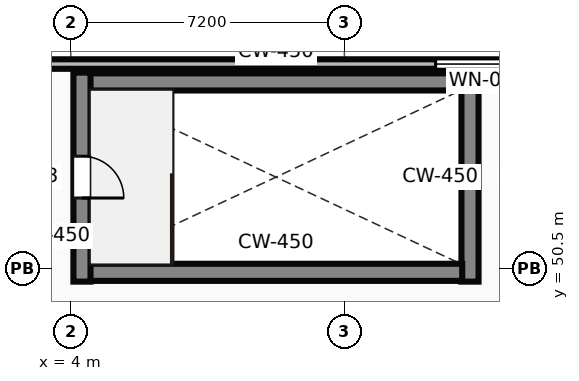
"""IFC4 building model, lengths in metres.
Left out: names, types, materials, properties, quantities, classifications, styles, units other than length and angle.
Written with IfcOpenShell. Run it as: python <this file> out.ifc"""

import sys

from ifc_helpers import new_model, si_unit, direction, frame, frame_2d, origin, place, context, subcontext, project, spatial, rectangle, extrude, source, transform, mapped, element, fill, save


model = new_model("IFC4")
c1 = context("Model", 3, precision=1e-05, world=origin(), true_north=direction((0.0, 1.0)))
c2 = subcontext(c1, "Body", "Model", "MODEL_VIEW")
j1 = project(units=[si_unit("LENGTHUNIT", "METRE"), si_unit("PLANEANGLEUNIT", "RADIAN")], contexts=[c1])
p1 = place(None, origin())
s1 = spatial("IfcSite", under=j1, at=p1, CompositionType="ELEMENT")
p2 = place(p1, origin())
s2 = spatial("IfcBuilding", under=s1, at=p2, CompositionType="ELEMENT")
p3 = place(p2, frame((0.0, 0.0, 21.0)))
s3 = spatial("IfcBuildingStorey", under=s2, at=p3, CompositionType="ELEMENT", Elevation=21.0)
m1 = source(origin(), c2, "Body", "SweptSolid", [
    extrude(rectangle(XDim=82.0, YDim=0.25, at=frame_2d((41.0, 0.0))), origin(), (0.0, 0.0, 1.0), 4.7),
])
p4 = place(p3, frame((82.0, 55.875, 0.0), z_axis=(0.0, 0.0, 1.0), x_axis=(-1.0, 0.0, 0.0)))
e1 = element("IfcWall", 1, at=p4, inside=s3, PredefinedType="STANDARD", context=c2, shape_type="MappedRepresentation", body=[
    mapped(m1, transform((0.0, 0.0, 0.0))),
])
p5 = place(p4, frame((8.0, 0.0, 0.9)))
e2 = element("IfcOpeningElement", 2, at=p5, cuts=e1, PredefinedType="OPENING", context=c2, shape_type="SweptSolid", body=[
    extrude(rectangle(XDim=2.4, YDim=2.2, at=frame_2d((1.2, 1.1))), frame((0.0, 0.135, 0.0), z_axis=(0.0, -1.0, 0.0), x_axis=(1.0, 0.0, 0.0)), (0.0, 0.0, 1.0), 0.27),
])
p6 = place(p4, frame((18.0, 0.0, 0.9)))
e3 = element("IfcOpeningElement", 3, at=p6, cuts=e1, PredefinedType="OPENING", context=c2, shape_type="SweptSolid", body=[
    extrude(rectangle(XDim=2.4, YDim=2.2, at=frame_2d((1.2, 1.1))), frame((0.0, 0.135, 0.0), z_axis=(0.0, -1.0, 0.0), x_axis=(1.0, 0.0, 0.0)), (0.0, 0.0, 1.0), 0.27),
])
p7 = place(p4, frame((28.0, 0.0, 0.9)))
e4 = element("IfcOpeningElement", 4, at=p7, cuts=e1, PredefinedType="OPENING", context=c2, shape_type="SweptSolid", body=[
    extrude(rectangle(XDim=2.4, YDim=2.2, at=frame_2d((1.2, 1.1))), frame((0.0, 0.135, 0.0), z_axis=(0.0, -1.0, 0.0), x_axis=(1.0, 0.0, 0.0)), (0.0, 0.0, 1.0), 0.27),
])
p8 = place(p4, frame((38.0, 0.0, 0.9)))
e5 = element("IfcOpeningElement", 5, at=p8, cuts=e1, PredefinedType="OPENING", context=c2, shape_type="SweptSolid", body=[
    extrude(rectangle(XDim=2.4, YDim=2.2, at=frame_2d((1.2, 1.1))), frame((0.0, 0.135, 0.0), z_axis=(0.0, -1.0, 0.0), x_axis=(1.0, 0.0, 0.0)), (0.0, 0.0, 1.0), 0.27),
])
p9 = place(p4, frame((46.5, 0.0, 0.9)))
e6 = element("IfcOpeningElement", 6, at=p9, cuts=e1, PredefinedType="OPENING", context=c2, shape_type="SweptSolid", body=[
    extrude(rectangle(XDim=2.4, YDim=2.2, at=frame_2d((1.2, 1.1))), frame((0.0, 0.135, 0.0), z_axis=(0.0, -1.0, 0.0), x_axis=(1.0, 0.0, 0.0)), (0.0, 0.0, 1.0), 0.27),
])
p10 = place(p4, frame((58.0, 0.0, 0.9)))
e7 = element("IfcOpeningElement", 7, at=p10, cuts=e1, PredefinedType="OPENING", context=c2, shape_type="SweptSolid", body=[
    extrude(rectangle(XDim=2.4, YDim=2.2, at=frame_2d((1.2, 1.1))), frame((0.0, 0.135, 0.0), z_axis=(0.0, -1.0, 0.0), x_axis=(1.0, 0.0, 0.0)), (0.0, 0.0, 1.0), 0.27),
])
p11 = place(p4, frame((66.0, 0.0, 0.9)))
e8 = element("IfcOpeningElement", 8, at=p11, cuts=e1, PredefinedType="OPENING", context=c2, shape_type="SweptSolid", body=[
    extrude(rectangle(XDim=2.4, YDim=2.2, at=frame_2d((1.2, 1.1))), frame((0.0, 0.135, 0.0), z_axis=(0.0, -1.0, 0.0), x_axis=(1.0, 0.0, 0.0)), (0.0, 0.0, 1.0), 0.27),
])
m2 = source(origin(), c2, "Body", "SweptSolid", [
    extrude(rectangle(XDim=5.5, YDim=0.45, at=frame_2d((2.75, 0.0))), origin(), (0.0, 0.0, 1.0), 4.7),
])
p12 = place(p3, frame((4.295, 50.15, 0.0), z_axis=(0.0, 0.0, 1.0), x_axis=(0.0, 1.0, 0.0)))
e9 = element("IfcWall", 9, at=p12, inside=s3, PredefinedType="SHEAR", context=c2, shape_type="MappedRepresentation", body=[
    mapped(m2, transform((0.0, 0.0, 0.0))),
])
p13 = place(p12, frame((2.2, 0.0, 0.0)))
e10 = element("IfcOpeningElement", 10, at=p13, cuts=e9, PredefinedType="OPENING", context=c2, shape_type="SweptSolid", body=[
    extrude(rectangle(XDim=1.1, YDim=2.15, at=frame_2d((0.55, 1.075))), frame((0.0, 0.235, 0.0), z_axis=(0.0, -1.0, 0.0), x_axis=(1.0, 0.0, 0.0)), (0.0, 0.0, 1.0), 0.47),
])
m3 = source(origin(), c2, "Body", "SweptSolid", [
    extrude(rectangle(XDim=9.8, YDim=0.45, at=frame_2d((4.9, 0.0))), origin(), (0.0, 0.0, 1.0), 4.7),
])
for number, where, z_axis, x_axis in (
    (11, (4.5, 50.395, 0.0), (0.0, 0.0, 1.0), (1.0, 0.0, 0.0)),
    (12, (4.5, 55.405, 0.0), (0.0, 0.0, 1.0), (1.0, 0.0, 0.0)),
):
    element("IfcWall", number, at=place(p3, frame(where, z_axis=z_axis, x_axis=x_axis)), inside=s3, PredefinedType="SHEAR", context=c2, shape_type="MappedRepresentation", body=[
        mapped(m3, transform((0.0, 0.0, 0.0))),
    ])
p14 = place(p3, frame((14.505, 50.15, 0.0), z_axis=(0.0, 0.0, 1.0), x_axis=(0.0, 1.0, 0.0)))
e13 = element("IfcWall", 13, at=p14, inside=s3, PredefinedType="SHEAR", context=c2, shape_type="MappedRepresentation", body=[
    mapped(m2, transform((0.0, 0.0, 0.0))),
])
m4 = source(origin(), c2, "Body", "SweptSolid", [
    extrude(rectangle(XDim=2.4, YDim=2.2, at=frame_2d((1.2, 1.1))), frame((0.0, 0.03, 0.0), z_axis=(0.0, -1.0, 0.0), x_axis=(1.0, 0.0, 0.0)), (0.0, 0.0, 1.0), 0.06),
])
p15 = place(p11, origin())
e14 = element("IfcWindow", 14, at=p15, inside=s3, PartitioningType="SINGLE_PANEL", PredefinedType="WINDOW", context=c2, shape_type="MappedRepresentation", body=[
    mapped(m4, transform((0.0, 0.0, 0.0))),
])
fill(e8, e14)
m5 = source(origin(), c2, "Body", "SweptSolid", [
    extrude(rectangle(XDim=1.1, YDim=2.15, at=frame_2d((0.55, 1.075))), frame((0.0, 0.025, 0.0), z_axis=(0.0, -1.0, 0.0), x_axis=(1.0, 0.0, 0.0)), (0.0, 0.0, 1.0), 0.05),
])
p16 = place(p13, frame((1.1, 0.0, 0.0), z_axis=(0.0, 0.0, 1.0), x_axis=(-1.0, 0.0, 0.0)))
e15 = element("IfcDoor", 15, at=p16, inside=s3, OperationType="SINGLE_SWING_LEFT", PredefinedType="DOOR", context=c2, shape_type="MappedRepresentation", body=[
    mapped(m5, transform((0.0, 0.0, 0.0))),
])
fill(e10, e15)
save(model, sys.argv[1])
